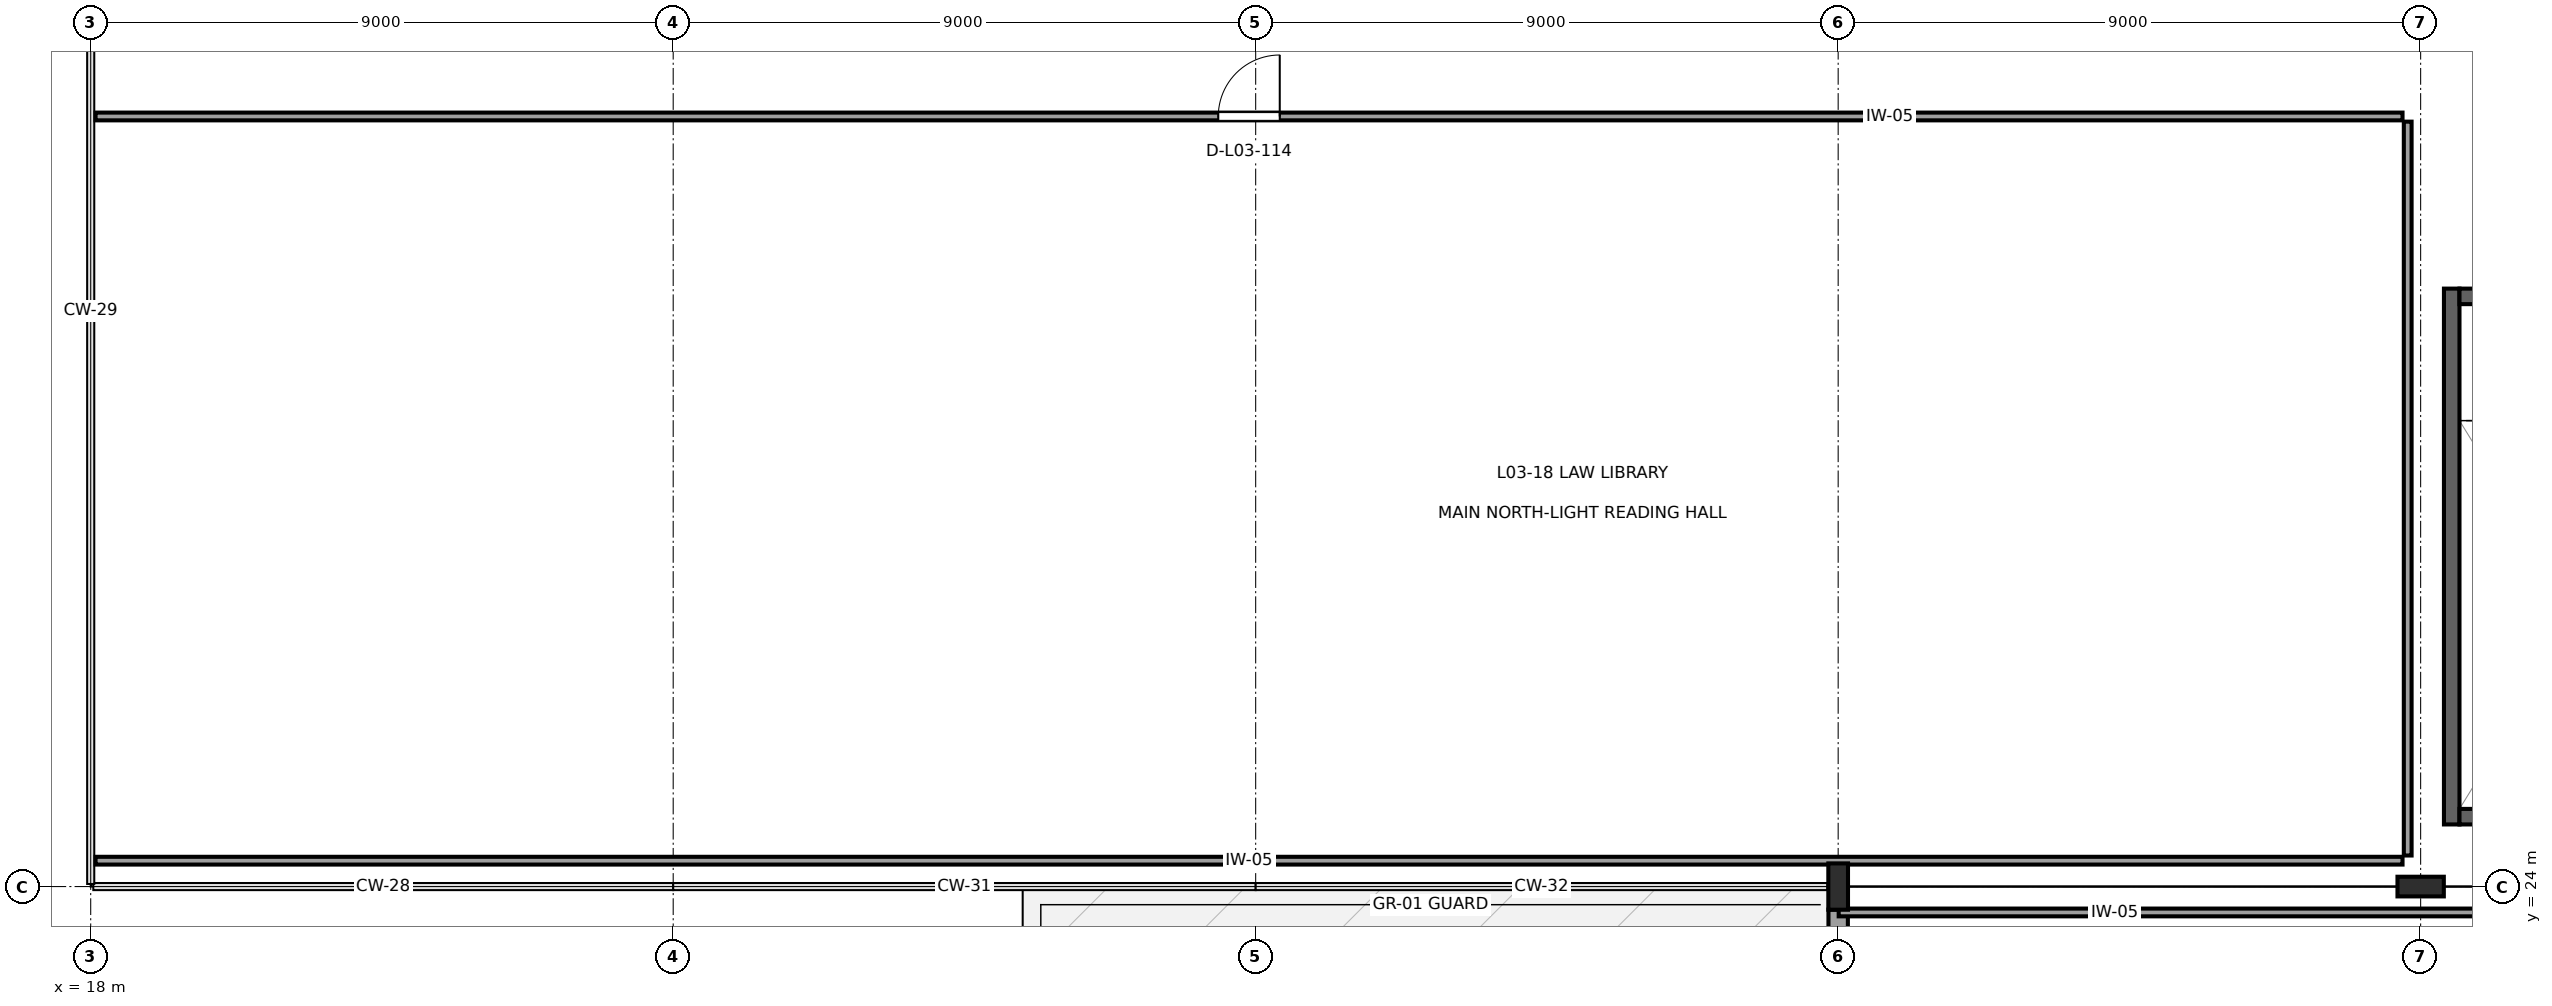
"""IFC4 building model, lengths in metres.
Left out: names, types, materials, properties, quantities, classifications, styles, units other than length and angle.
Written with IfcOpenShell. Run it as: python <this file> out.ifc"""

import sys

from ifc_helpers import new_model, si_unit, direction, frame, frame_2d, origin, origin_2d, place, context, subcontext, project, spatial, rectangle, i_section, extrude, element, fill, save


model = new_model("IFC4")
c1 = context("Model", 3, precision=1e-05, world=origin(), true_north=direction((0.0, 1.0)))
c2 = subcontext(c1, "Body", "Model", "MODEL_VIEW")
j1 = project(units=[si_unit("LENGTHUNIT", "METRE"), si_unit("PLANEANGLEUNIT", "RADIAN")], contexts=[c1])
p1 = place(None, origin())
s1 = spatial("IfcSite", under=j1, at=p1, CompositionType="ELEMENT")
p2 = place(p1, origin())
s2 = spatial("IfcBuilding", under=s1, at=p2, CompositionType="ELEMENT")
p3 = place(p2, frame((0.0, 0.0, 14.4)))
s3 = spatial("IfcBuildingStorey", under=s2, at=p3, CompositionType="ELEMENT", Elevation=14.4)
for number, where, z_axis, x_axis in (
    (1, (45.0, 24.0, 0.0), (0.0, 0.0, 1.0), (1.0, 0.0, 0.0)),
    (2, (54.0, 24.0, 0.0), (0.0, 0.0, 1.0), (0.0, 1.0, 0.0)),
):
    element("IfcColumn", number, at=place(p3, frame(where, z_axis=z_axis, x_axis=x_axis)), inside=s3, PredefinedType="COLUMN", context=c2, shape_type="SweptSolid", body=[
        extrude(i_section(OverallWidth=0.304, OverallDepth=0.716, WebThickness=0.021, FlangeThickness=0.04, at=origin_2d()), origin(), (0.0, 0.0, 1.0), 4.5),
    ])
p4 = place(p3, frame((45.0, 23.644, 0.0), z_axis=(0.0, 0.0, 1.0), x_axis=(0.0, -1.0, 0.0)))
e3 = element("IfcWall", 3, at=p4, inside=s3, PredefinedType="SOLIDWALL", context=c2, shape_type="SweptSolid", body=[
    extrude(rectangle(XDim=11.336, YDim=0.3, at=frame_2d((5.668, 0.0))), origin(), (0.0, 0.0, 1.0), 3.685),
])
p5 = place(p4, frame((5.444, 0.0, 0.0)))
e4 = element("IfcOpeningElement", 4, at=p5, cuts=e3, PredefinedType="OPENING", context=c2, shape_type="SweptSolid", body=[
    extrude(rectangle(XDim=1.4, YDim=2.3, at=frame_2d((0.7, 1.15))), frame((0.0, 0.165, 0.0), z_axis=(0.0, -1.0, 0.0), x_axis=(1.0, 0.0, 0.0)), (0.0, 0.0, 1.0), 0.33),
])
p6 = place(p3, frame((54.48, 24.96, 0.0), z_axis=(0.0, 0.0, 1.0), x_axis=(0.0, 1.0, 0.0)))
e5 = element("IfcWall", 5, at=p6, inside=s3, PredefinedType="SHEAR", context=c2, shape_type="SweptSolid", body=[
    extrude(rectangle(XDim=8.28, YDim=0.24, at=frame_2d((4.14, 0.0))), origin(), (0.0, 0.0, 1.0), 4.31),
])
for number, where, z_axis, x_axis in (
    (6, (54.6, 25.08, 0.0), (0.0, 0.0, 1.0), (1.0, 0.0, 0.0)),
    (7, (54.6, 33.12, 0.0), (0.0, 0.0, 1.0), (1.0, 0.0, 0.0)),
):
    element("IfcWall", number, at=place(p3, frame(where, z_axis=z_axis, x_axis=x_axis)), inside=s3, PredefinedType="SHEAR", context=c2, shape_type="SweptSolid", body=[
        extrude(rectangle(XDim=3.7, YDim=0.24, at=frame_2d((1.85, 0.0))), origin(), (0.0, 0.0, 1.0), 4.31),
    ])
p7 = place(p3, frame((18.075, 35.9, 0.0), z_axis=(0.0, 0.0, 1.0), x_axis=(1.0, 0.0, 0.0)))
e8 = element("IfcWall", 8, at=p7, inside=s3, PredefinedType="PARTITIONING", context=c2, shape_type="SweptSolid", body=[
    extrude(rectangle(XDim=35.645, YDim=0.12, at=frame_2d((17.823, 0.0))), origin(), (0.0, 0.0, 1.0), 4.14),
])
p8 = place(p7, frame((17.347, 0.0, 0.0)))
e9 = element("IfcOpeningElement", 9, at=p8, cuts=e8, PredefinedType="OPENING", context=c2, shape_type="SweptSolid", body=[
    extrude(rectangle(XDim=0.95, YDim=2.15, at=frame_2d((0.475, 1.075))), frame((0.0, 0.075, 0.0), z_axis=(0.0, -1.0, 0.0), x_axis=(1.0, 0.0, 0.0)), (0.0, 0.0, 1.0), 0.15),
])
p9 = place(p3, frame((53.8, 35.82, 0.0), z_axis=(0.0, 0.0, 1.0), x_axis=(0.0, -1.0, 0.0)))
e10 = element("IfcWall", 10, at=p9, inside=s3, PredefinedType="PARTITIONING", context=c2, shape_type="SweptSolid", body=[
    extrude(rectangle(XDim=11.34, YDim=0.12, at=frame_2d((5.67, 0.0))), origin(), (0.0, 0.0, 1.0), 4.14),
])
p10 = place(p3, frame((53.72, 24.4, 0.0), z_axis=(0.0, 0.0, 1.0), x_axis=(-1.0, 0.0, 0.0)))
e11 = element("IfcWall", 11, at=p10, inside=s3, PredefinedType="PARTITIONING", context=c2, shape_type="SweptSolid", body=[
    extrude(rectangle(XDim=35.645, YDim=0.12, at=frame_2d((17.823, 0.0))), origin(), (0.0, 0.0, 1.0), 4.14),
])
p11 = place(p3, frame((45.008, 23.6, 0.0), z_axis=(0.0, 0.0, 1.0), x_axis=(1.0, 0.0, 0.0)))
e12 = element("IfcWall", 12, at=p11, inside=s3, PredefinedType="PARTITIONING", context=c2, shape_type="SweptSolid", body=[
    extrude(rectangle(XDim=18.112, YDim=0.12, at=frame_2d((9.056, 0.0))), origin(), (0.0, 0.0, 1.0), 4.14),
])
p12 = place(p11, frame((10.03, 0.0, 0.0)))
e13 = element("IfcOpeningElement", 13, at=p12, cuts=e12, PredefinedType="OPENING", context=c2, shape_type="SweptSolid", body=[
    extrude(rectangle(XDim=0.95, YDim=2.15, at=frame_2d((0.475, 1.075))), frame((0.0, 0.075, 0.0), z_axis=(0.0, -1.0, 0.0), x_axis=(1.0, 0.0, 0.0)), (0.0, 0.0, 1.0), 0.15),
])
p13 = place(p8, origin())
e14 = element("IfcDoor", 14, at=p13, inside=s3, OperationType="SINGLE_SWING_RIGHT", PredefinedType="DOOR", context=c2, shape_type="SweptSolid", body=[
    extrude(rectangle(XDim=0.95, YDim=2.15, at=frame_2d((0.475, 1.075))), frame((0.0, 0.025, 0.0), z_axis=(0.0, -1.0, 0.0), x_axis=(1.0, 0.0, 0.0)), (0.0, 0.0, 1.0), 0.05),
])
fill(e9, e14)
save(model, sys.argv[1])
